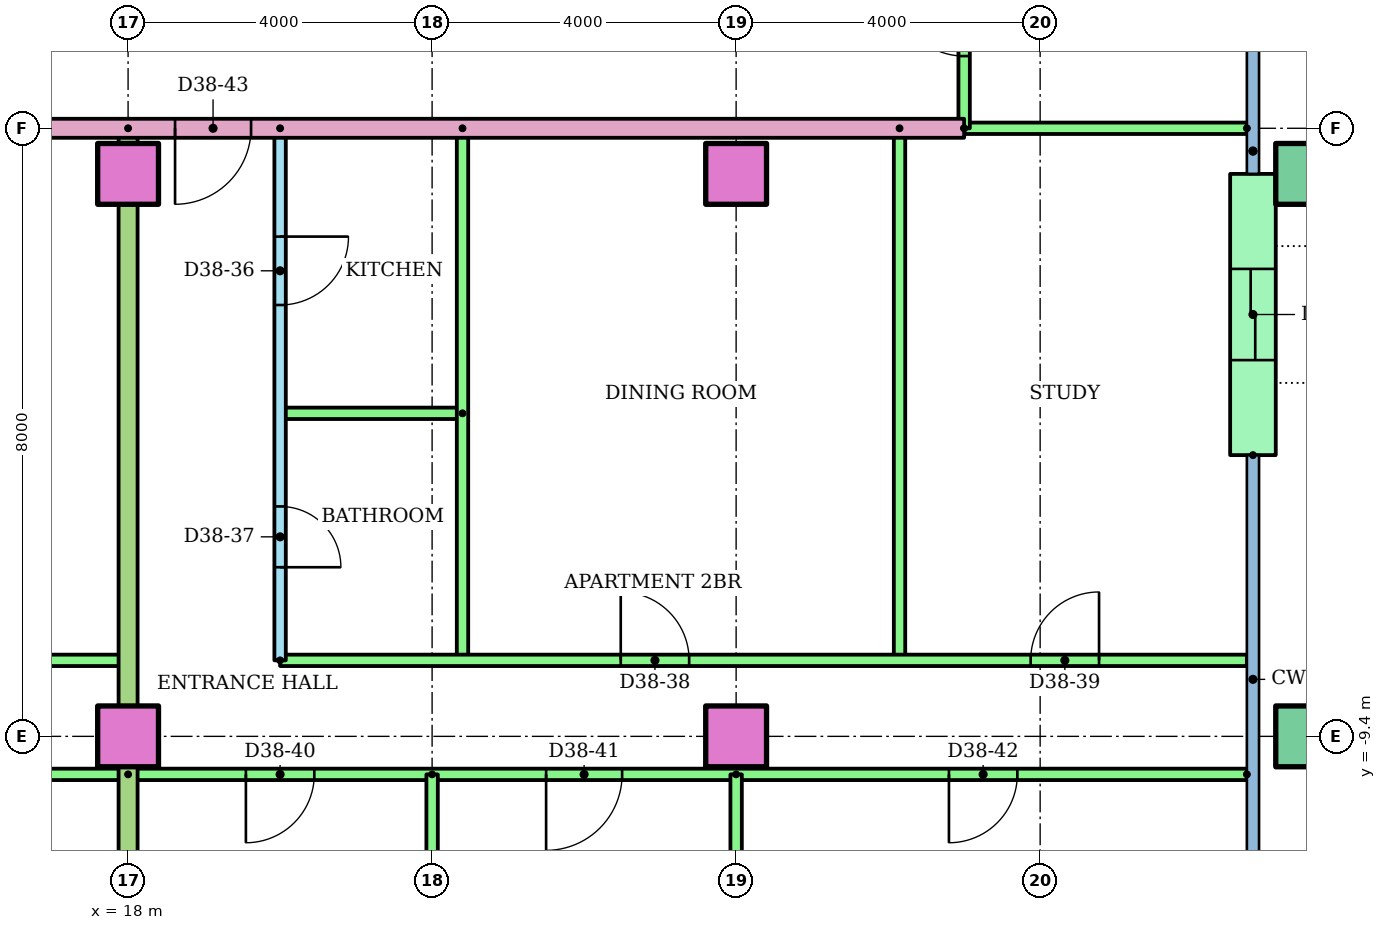
"""IFC4 building model, lengths in metres.
Left out: names, types, materials, properties, quantities, classifications, styles, units other than length and angle.
Written with IfcOpenShell. Run it as: python <this file> out.ifc"""

import sys

from ifc_helpers import new_model, si_unit, direction, frame, frame_2d, origin, origin_2d, place, context, subcontext, project, spatial, rectangle, hollow_rectangle, extrude, element, fill, save


model = new_model("IFC4")
c1 = context("Model", 3, precision=1e-05, world=origin(), true_north=direction((0.0, 1.0)))
c2 = subcontext(c1, "Body", "Model", "MODEL_VIEW")
j1 = project(units=[si_unit("LENGTHUNIT", "METRE"), si_unit("PLANEANGLEUNIT", "RADIAN")], contexts=[c1])
p1 = place(None, origin())
s1 = spatial("IfcSite", under=j1, at=p1, CompositionType="ELEMENT")
p2 = place(p1, origin())
s2 = spatial("IfcBuilding", under=s1, at=p2, CompositionType="ELEMENT")
p3 = place(p2, frame((0.0, 0.0, 145.4)))
s3 = spatial("IfcBuildingStorey", under=s2, at=p3, CompositionType="ELEMENT", Elevation=145.4)
for number, where in (
    (1, (18.0, -9.4, 0.0)),
    (2, (26.0, -9.4, 0.0)),
):
    element("IfcColumn", number, at=place(p3, frame(where)), inside=s3, PredefinedType="COLUMN", context=c2, shape_type="SweptSolid", body=[
        extrude(rectangle(XDim=0.8, YDim=0.8, at=origin_2d()), origin(), (0.0, 0.0, 1.0), 3.2),
    ])
p4 = place(p3, frame((33.5, -9.4, 0.0)))
e3 = element("IfcColumn", 3, at=p4, inside=s3, PredefinedType="COLUMN", context=c2, shape_type="SweptSolid", body=[
    extrude(hollow_rectangle(XDim=0.8, YDim=0.8, WallThickness=0.04, at=origin_2d()), origin(), (0.0, 0.0, 1.0), 3.2),
])
for number, where in (
    (4, (18.0, -2.0, 0.0)),
    (5, (26.0, -2.0, 0.0)),
):
    element("IfcColumn", number, at=place(p3, frame(where)), inside=s3, PredefinedType="COLUMN", context=c2, shape_type="SweptSolid", body=[
        extrude(rectangle(XDim=0.8, YDim=0.8, at=origin_2d()), origin(), (0.0, 0.0, 1.0), 3.2),
    ])
p5 = place(p3, frame((33.5, -2.0, 0.0)))
e6 = element("IfcColumn", 6, at=p5, inside=s3, PredefinedType="COLUMN", context=c2, shape_type="SweptSolid", body=[
    extrude(hollow_rectangle(XDim=0.8, YDim=0.8, WallThickness=0.04, at=origin_2d()), origin(), (0.0, 0.0, 1.0), 3.2),
])
p6 = place(p3, frame((32.8, -5.7, 0.0), z_axis=(0.0, 0.0, 1.0), x_axis=(0.0, 1.0, 0.0)))
e7 = element("IfcWall", 7, at=p6, inside=s3, PredefinedType="STANDARD", context=c2, shape_type="SweptSolid", body=[
    extrude(rectangle(XDim=3.7, YDim=0.6, at=frame_2d((1.85, 0.0))), origin(), (0.0, 0.0, 1.0), 2.92),
])
p7 = place(p6, frame((1.25, 0.0, 0.0)))
e8 = element("IfcOpeningElement", 8, at=p7, cuts=e7, PredefinedType="OPENING", context=c2, shape_type="SweptSolid", body=[
    extrude(rectangle(XDim=1.2, YDim=2.1, at=frame_2d((0.6, 1.05))), frame((0.0, 0.31, 0.0), z_axis=(0.0, -1.0, 0.0), x_axis=(1.0, 0.0, 0.0)), (0.0, 0.0, 1.0), 0.62),
])
p8 = place(p3, frame((-4.0, -8.4, 0.0)))
e9 = element("IfcWall", 9, at=p8, inside=s3, PredefinedType="PARTITIONING", context=c2, shape_type="SweptSolid", body=[
    extrude(rectangle(XDim=22.0, YDim=0.15, at=frame_2d((11.0, 0.0))), origin(), (0.0, 0.0, 1.0), 2.4),
])
p9 = place(p8, frame((4.45, 0.0, 0.0)))
e10 = element("IfcOpeningElement", 10, at=p9, cuts=e9, PredefinedType="OPENING", context=c2, shape_type="SweptSolid", body=[
    extrude(rectangle(XDim=0.9, YDim=2.1, at=frame_2d((0.45, 1.05))), frame((0.0, 0.085, 0.0), z_axis=(0.0, -1.0, 0.0), x_axis=(1.0, 0.0, 0.0)), (0.0, 0.0, 1.0), 0.17),
])
p10 = place(p8, frame((10.2, 0.0, 0.0)))
e11 = element("IfcOpeningElement", 11, at=p10, cuts=e9, PredefinedType="OPENING", context=c2, shape_type="SweptSolid", body=[
    extrude(rectangle(XDim=0.9, YDim=2.1, at=frame_2d((0.45, 1.05))), frame((0.0, 0.085, 0.0), z_axis=(0.0, -1.0, 0.0), x_axis=(1.0, 0.0, 0.0)), (0.0, 0.0, 1.0), 0.17),
])
p11 = place(p8, frame((17.5, 0.0, 0.0)))
e12 = element("IfcOpeningElement", 12, at=p11, cuts=e9, PredefinedType="OPENING", context=c2, shape_type="SweptSolid", body=[
    extrude(rectangle(XDim=0.9, YDim=2.1, at=frame_2d((0.45, 1.05))), frame((0.0, 0.085, 0.0), z_axis=(0.0, -1.0, 0.0), x_axis=(1.0, 0.0, 0.0)), (0.0, 0.0, 1.0), 0.17),
])
p12 = place(p3, frame((18.0, -9.9, 0.0), z_axis=(0.0, 0.0, 1.0), x_axis=(-1.0, 0.0, 0.0)))
e13 = element("IfcWall", 13, at=p12, inside=s3, PredefinedType="PARTITIONING", context=c2, shape_type="SweptSolid", body=[
    extrude(rectangle(XDim=24.0, YDim=0.15, at=frame_2d((12.0, 0.0))), origin(), (0.0, 0.0, 1.0), 2.4),
])
p13 = place(p12, frame((19.5, 0.0, 0.0)))
e14 = element("IfcOpeningElement", 14, at=p13, cuts=e13, PredefinedType="OPENING", context=c2, shape_type="SweptSolid", body=[
    extrude(rectangle(XDim=1.0, YDim=2.1, at=frame_2d((0.5, 1.05))), frame((0.0, 0.085, 0.0), z_axis=(0.0, -1.0, 0.0), x_axis=(1.0, 0.0, 0.0)), (0.0, 0.0, 1.0), 0.17),
])
p14 = place(p12, frame((13.55, 0.0, 0.0)))
e15 = element("IfcOpeningElement", 15, at=p14, cuts=e13, PredefinedType="OPENING", context=c2, shape_type="SweptSolid", body=[
    extrude(rectangle(XDim=0.9, YDim=2.1, at=frame_2d((0.45, 1.05))), frame((0.0, 0.085, 0.0), z_axis=(0.0, -1.0, 0.0), x_axis=(1.0, 0.0, 0.0)), (0.0, 0.0, 1.0), 0.17),
])
p15 = place(p12, frame((9.55, 0.0, 0.0)))
e16 = element("IfcOpeningElement", 16, at=p15, cuts=e13, PredefinedType="OPENING", context=c2, shape_type="SweptSolid", body=[
    extrude(rectangle(XDim=0.9, YDim=2.1, at=frame_2d((0.45, 1.05))), frame((0.0, 0.085, 0.0), z_axis=(0.0, -1.0, 0.0), x_axis=(1.0, 0.0, 0.0)), (0.0, 0.0, 1.0), 0.17),
])
p16 = place(p12, frame((5.55, 0.0, 0.0)))
e17 = element("IfcOpeningElement", 17, at=p16, cuts=e13, PredefinedType="OPENING", context=c2, shape_type="SweptSolid", body=[
    extrude(rectangle(XDim=0.9, YDim=2.1, at=frame_2d((0.45, 1.05))), frame((0.0, 0.085, 0.0), z_axis=(0.0, -1.0, 0.0), x_axis=(1.0, 0.0, 0.0)), (0.0, 0.0, 1.0), 0.17),
])
p17 = place(p12, frame((1.55, 0.0, 0.0)))
e18 = element("IfcOpeningElement", 18, at=p17, cuts=e13, PredefinedType="OPENING", context=c2, shape_type="SweptSolid", body=[
    extrude(rectangle(XDim=0.9, YDim=2.1, at=frame_2d((0.45, 1.05))), frame((0.0, 0.085, 0.0), z_axis=(0.0, -1.0, 0.0), x_axis=(1.0, 0.0, 0.0)), (0.0, 0.0, 1.0), 0.17),
])
p18 = place(p3, frame((20.0, -1.4, 0.0), z_axis=(0.0, 0.0, 1.0), x_axis=(0.0, -1.0, 0.0)))
e19 = element("IfcWall", 19, at=p18, inside=s3, PredefinedType="PARTITIONING", context=c2, shape_type="SweptSolid", body=[
    extrude(rectangle(XDim=7.0, YDim=0.15, at=frame_2d((3.5, 0.0))), origin(), (0.0, 0.0, 1.0), 2.4),
])
p19 = place(p18, frame((1.425, 0.0, 0.0)))
e20 = element("IfcOpeningElement", 20, at=p19, cuts=e19, PredefinedType="OPENING", context=c2, shape_type="SweptSolid", body=[
    extrude(rectangle(XDim=0.9, YDim=2.1, at=frame_2d((0.45, 1.05))), frame((0.0, 0.085, 0.0), z_axis=(0.0, -1.0, 0.0), x_axis=(1.0, 0.0, 0.0)), (0.0, 0.0, 1.0), 0.17),
])
p20 = place(p18, frame((4.975, 0.0, 0.0)))
e21 = element("IfcOpeningElement", 21, at=p20, cuts=e19, PredefinedType="OPENING", context=c2, shape_type="SweptSolid", body=[
    extrude(rectangle(XDim=0.8, YDim=2.1, at=frame_2d((0.4, 1.05))), frame((0.0, 0.085, 0.0), z_axis=(0.0, -1.0, 0.0), x_axis=(1.0, 0.0, 0.0)), (0.0, 0.0, 1.0), 0.17),
])
p21 = place(p3, frame((22.4, -5.15, 0.0), z_axis=(0.0, 0.0, 1.0), x_axis=(-1.0, 0.0, 0.0)))
e22 = element("IfcWall", 22, at=p21, inside=s3, PredefinedType="PARTITIONING", context=c2, shape_type="SweptSolid", body=[
    extrude(rectangle(XDim=2.4, YDim=0.15, at=frame_2d((1.2, 0.0))), origin(), (0.0, 0.0, 1.0), 2.4),
])
for number, where, z_axis, x_axis in (
    (23, (22.4, -1.4, 0.0), (0.0, 0.0, 1.0), (0.0, -1.0, 0.0)),
    (24, (28.15, -1.4, 0.0), (0.0, 0.0, 1.0), (0.0, -1.0, 0.0)),
):
    element("IfcWall", number, at=place(p3, frame(where, z_axis=z_axis, x_axis=x_axis)), inside=s3, PredefinedType="PARTITIONING", context=c2, shape_type="SweptSolid", body=[
        extrude(rectangle(XDim=7.0, YDim=0.15, at=frame_2d((3.5, 0.0))), origin(), (0.0, 0.0, 1.0), 2.4),
    ])
p22 = place(p3, frame((20.0, -8.4, 0.0)))
e25 = element("IfcWall", 25, at=p22, inside=s3, PredefinedType="PARTITIONING", context=c2, shape_type="SweptSolid", body=[
    extrude(rectangle(XDim=12.72, YDim=0.15, at=frame_2d((6.36, 0.0))), origin(), (0.0, 0.0, 1.0), 2.4),
])
p23 = place(p22, frame((4.482, 0.0, 0.0)))
e26 = element("IfcOpeningElement", 26, at=p23, cuts=e25, PredefinedType="OPENING", context=c2, shape_type="SweptSolid", body=[
    extrude(rectangle(XDim=0.9, YDim=2.1, at=frame_2d((0.45, 1.05))), frame((0.0, 0.085, 0.0), z_axis=(0.0, -1.0, 0.0), x_axis=(1.0, 0.0, 0.0)), (0.0, 0.0, 1.0), 0.17),
])
p24 = place(p22, frame((9.875, 0.0, 0.0)))
e27 = element("IfcOpeningElement", 27, at=p24, cuts=e25, PredefinedType="OPENING", context=c2, shape_type="SweptSolid", body=[
    extrude(rectangle(XDim=0.9, YDim=2.1, at=frame_2d((0.45, 1.05))), frame((0.0, 0.085, 0.0), z_axis=(0.0, -1.0, 0.0), x_axis=(1.0, 0.0, 0.0)), (0.0, 0.0, 1.0), 0.17),
])
p25 = place(p3, frame((32.72, -9.9, 0.0), z_axis=(0.0, 0.0, 1.0), x_axis=(-1.0, 0.0, 0.0)))
e28 = element("IfcWall", 28, at=p25, inside=s3, PredefinedType="PARTITIONING", context=c2, shape_type="SweptSolid", body=[
    extrude(rectangle(XDim=14.72, YDim=0.15, at=frame_2d((7.36, 0.0))), origin(), (0.0, 0.0, 1.0), 2.4),
])
p26 = place(p25, frame((12.27, 0.0, 0.0)))
e29 = element("IfcOpeningElement", 29, at=p26, cuts=e28, PredefinedType="OPENING", context=c2, shape_type="SweptSolid", body=[
    extrude(rectangle(XDim=0.9, YDim=2.1, at=frame_2d((0.45, 1.05))), frame((0.0, 0.085, 0.0), z_axis=(0.0, -1.0, 0.0), x_axis=(1.0, 0.0, 0.0)), (0.0, 0.0, 1.0), 0.17),
])
p27 = place(p25, frame((8.22, 0.0, 0.0)))
e30 = element("IfcOpeningElement", 30, at=p27, cuts=e28, PredefinedType="OPENING", context=c2, shape_type="SweptSolid", body=[
    extrude(rectangle(XDim=1.0, YDim=2.1, at=frame_2d((0.5, 1.05))), frame((0.0, 0.085, 0.0), z_axis=(0.0, -1.0, 0.0), x_axis=(1.0, 0.0, 0.0)), (0.0, 0.0, 1.0), 0.17),
])
p28 = place(p25, frame((3.02, 0.0, 0.0)))
e31 = element("IfcOpeningElement", 31, at=p28, cuts=e28, PredefinedType="OPENING", context=c2, shape_type="SweptSolid", body=[
    extrude(rectangle(XDim=0.9, YDim=2.1, at=frame_2d((0.45, 1.05))), frame((0.0, 0.085, 0.0), z_axis=(0.0, -1.0, 0.0), x_axis=(1.0, 0.0, 0.0)), (0.0, 0.0, 1.0), 0.17),
])
p29 = place(p3, frame((22.0, -9.9, 0.0), z_axis=(0.0, 0.0, 1.0), x_axis=(0.0, -1.0, 0.0)))
e32 = element("IfcWall", 32, at=p29, inside=s3, PredefinedType="PARTITIONING", context=c2, shape_type="SweptSolid", body=[
    extrude(rectangle(XDim=6.421, YDim=0.15, at=frame_2d((3.21, 0.0))), origin(), (0.0, 0.0, 1.0), 2.4),
])
p30 = place(p3, frame((26.0, -9.9, 0.0), z_axis=(0.0, 0.0, 1.0), x_axis=(0.0, -1.0, 0.0)))
e33 = element("IfcWall", 33, at=p30, inside=s3, PredefinedType="PARTITIONING", context=c2, shape_type="SweptSolid", body=[
    extrude(rectangle(XDim=6.41, YDim=0.15, at=frame_2d((3.205, 0.0))), origin(), (0.0, 0.0, 1.0), 2.4),
])
p31 = place(p3, frame((18.0, -1.4, 0.0), z_axis=(0.0, 0.0, 1.0), x_axis=(0.0, -1.0, 0.0)))
e34 = element("IfcWall", 34, at=p31, inside=s3, PredefinedType="PARTITIONING", context=c2, shape_type="SweptSolid", body=[
    extrude(rectangle(XDim=14.91, YDim=0.25, at=frame_2d((7.455, 0.0))), origin(), (0.0, 0.0, 1.0), 2.4),
])
p32 = place(p3, frame((29.0, -1.4, 0.0), z_axis=(0.0, 0.0, 1.0), x_axis=(-1.0, 0.0, 0.0)))
e35 = element("IfcWall", 35, at=p32, inside=s3, PredefinedType="PARTITIONING", context=c2, shape_type="SweptSolid", body=[
    extrude(rectangle(XDim=15.0, YDim=0.25, at=frame_2d((7.5, 0.0))), origin(), (0.0, 0.0, 1.0), 2.4),
])
p33 = place(p32, frame((9.382, 0.0, 0.0)))
e36 = element("IfcOpeningElement", 36, at=p33, cuts=e35, PredefinedType="OPENING", context=c2, shape_type="SweptSolid", body=[
    extrude(rectangle(XDim=1.0, YDim=2.1, at=frame_2d((0.5, 1.05))), frame((0.0, 0.135, 0.0), z_axis=(0.0, -1.0, 0.0), x_axis=(1.0, 0.0, 0.0)), (0.0, 0.0, 1.0), 0.27),
])
p34 = place(p3, frame((32.72, -1.4, 0.0), z_axis=(0.0, 0.0, 1.0), x_axis=(-1.0, 0.0, 0.0)))
e37 = element("IfcWall", 37, at=p34, inside=s3, PredefinedType="PARTITIONING", context=c2, shape_type="SweptSolid", body=[
    extrude(rectangle(XDim=3.72, YDim=0.15, at=frame_2d((1.86, 0.0))), origin(), (0.0, 0.0, 1.0), 2.4),
])
p35 = place(p3, frame((29.0, -1.4, 0.0), z_axis=(0.0, 0.0, 1.0), x_axis=(0.0, 1.0, 0.0)))
e38 = element("IfcWall", 38, at=p35, inside=s3, PredefinedType="PARTITIONING", context=c2, shape_type="SweptSolid", body=[
    extrude(rectangle(XDim=2.8, YDim=0.15, at=frame_2d((1.4, 0.0))), origin(), (0.0, 0.0, 1.0), 2.4),
])
p36 = place(p35, frame((0.95, 0.0, 0.0)))
e39 = element("IfcOpeningElement", 39, at=p36, cuts=e38, PredefinedType="OPENING", context=c2, shape_type="SweptSolid", body=[
    extrude(rectangle(XDim=0.9, YDim=2.1, at=frame_2d((0.45, 1.05))), frame((0.0, 0.085, 0.0), z_axis=(0.0, -1.0, 0.0), x_axis=(1.0, 0.0, 0.0)), (0.0, 0.0, 1.0), 0.17),
])
p37 = place(p19, origin())
e40 = element("IfcDoor", 40, at=p37, inside=s3, OperationType="SINGLE_SWING_LEFT", PredefinedType="DOOR", context=c2, shape_type="SweptSolid", body=[
    extrude(rectangle(XDim=0.9, YDim=2.1, at=frame_2d((0.45, 1.05))), frame((0.0, 0.025, 0.0), z_axis=(0.0, -1.0, 0.0), x_axis=(1.0, 0.0, 0.0)), (0.0, 0.0, 1.0), 0.05),
])
fill(e20, e40)
p38 = place(p20, origin())
e41 = element("IfcDoor", 41, at=p38, inside=s3, OperationType="SINGLE_SWING_RIGHT", PredefinedType="DOOR", context=c2, shape_type="SweptSolid", body=[
    extrude(rectangle(XDim=0.8, YDim=2.1, at=frame_2d((0.4, 1.05))), frame((0.0, 0.025, 0.0), z_axis=(0.0, -1.0, 0.0), x_axis=(1.0, 0.0, 0.0)), (0.0, 0.0, 1.0), 0.05),
])
fill(e21, e41)
p39 = place(p23, origin())
e42 = element("IfcDoor", 42, at=p39, inside=s3, OperationType="SINGLE_SWING_LEFT", PredefinedType="DOOR", context=c2, shape_type="SweptSolid", body=[
    extrude(rectangle(XDim=0.9, YDim=2.1, at=frame_2d((0.45, 1.05))), frame((0.0, 0.025, 0.0), z_axis=(0.0, -1.0, 0.0), x_axis=(1.0, 0.0, 0.0)), (0.0, 0.0, 1.0), 0.05),
])
fill(e26, e42)
p40 = place(p24, origin())
e43 = element("IfcDoor", 43, at=p40, inside=s3, OperationType="SINGLE_SWING_RIGHT", PredefinedType="DOOR", context=c2, shape_type="SweptSolid", body=[
    extrude(rectangle(XDim=0.9, YDim=2.1, at=frame_2d((0.45, 1.05))), frame((0.0, 0.025, 0.0), z_axis=(0.0, -1.0, 0.0), x_axis=(1.0, 0.0, 0.0)), (0.0, 0.0, 1.0), 0.05),
])
fill(e27, e43)
p41 = place(p26, origin())
e44 = element("IfcDoor", 44, at=p41, inside=s3, OperationType="SINGLE_SWING_RIGHT", PredefinedType="DOOR", context=c2, shape_type="SweptSolid", body=[
    extrude(rectangle(XDim=0.9, YDim=2.1, at=frame_2d((0.45, 1.05))), frame((0.0, 0.025, 0.0), z_axis=(0.0, -1.0, 0.0), x_axis=(1.0, 0.0, 0.0)), (0.0, 0.0, 1.0), 0.05),
])
fill(e29, e44)
p42 = place(p27, origin())
e45 = element("IfcDoor", 45, at=p42, inside=s3, OperationType="SINGLE_SWING_RIGHT", PredefinedType="DOOR", context=c2, shape_type="SweptSolid", body=[
    extrude(rectangle(XDim=1.0, YDim=2.1, at=frame_2d((0.5, 1.05))), frame((0.0, 0.025, 0.0), z_axis=(0.0, -1.0, 0.0), x_axis=(1.0, 0.0, 0.0)), (0.0, 0.0, 1.0), 0.05),
])
fill(e30, e45)
p43 = place(p28, origin())
e46 = element("IfcDoor", 46, at=p43, inside=s3, OperationType="SINGLE_SWING_RIGHT", PredefinedType="DOOR", context=c2, shape_type="SweptSolid", body=[
    extrude(rectangle(XDim=0.9, YDim=2.1, at=frame_2d((0.45, 1.05))), frame((0.0, 0.025, 0.0), z_axis=(0.0, -1.0, 0.0), x_axis=(1.0, 0.0, 0.0)), (0.0, 0.0, 1.0), 0.05),
])
fill(e31, e46)
p44 = place(p33, origin())
e47 = element("IfcDoor", 47, at=p44, inside=s3, OperationType="SINGLE_SWING_RIGHT", PredefinedType="DOOR", context=c2, shape_type="SweptSolid", body=[
    extrude(rectangle(XDim=1.0, YDim=2.1, at=frame_2d((0.5, 1.05))), frame((0.0, 0.025, 0.0), z_axis=(0.0, -1.0, 0.0), x_axis=(1.0, 0.0, 0.0)), (0.0, 0.0, 1.0), 0.05),
])
fill(e36, e47)
p45 = place(p36, origin())
e48 = element("IfcDoor", 48, at=p45, inside=s3, OperationType="SINGLE_SWING_RIGHT", PredefinedType="DOOR", context=c2, shape_type="SweptSolid", body=[
    extrude(rectangle(XDim=0.9, YDim=2.1, at=frame_2d((0.45, 1.05))), frame((0.0, 0.025, 0.0), z_axis=(0.0, -1.0, 0.0), x_axis=(1.0, 0.0, 0.0)), (0.0, 0.0, 1.0), 0.05),
])
fill(e39, e48)
p46 = place(p7, origin())
e49 = element("IfcDoor", 49, at=p46, inside=s3, OperationType="SLIDING_TO_LEFT", PredefinedType="DOOR", context=c2, shape_type="SweptSolid", body=[
    extrude(rectangle(XDim=1.2, YDim=2.1, at=frame_2d((0.6, 1.05))), frame((0.0, 0.025, 0.0), z_axis=(0.0, -1.0, 0.0), x_axis=(1.0, 0.0, 0.0)), (0.0, 0.0, 1.0), 0.05),
])
fill(e8, e49)
save(model, sys.argv[1])
